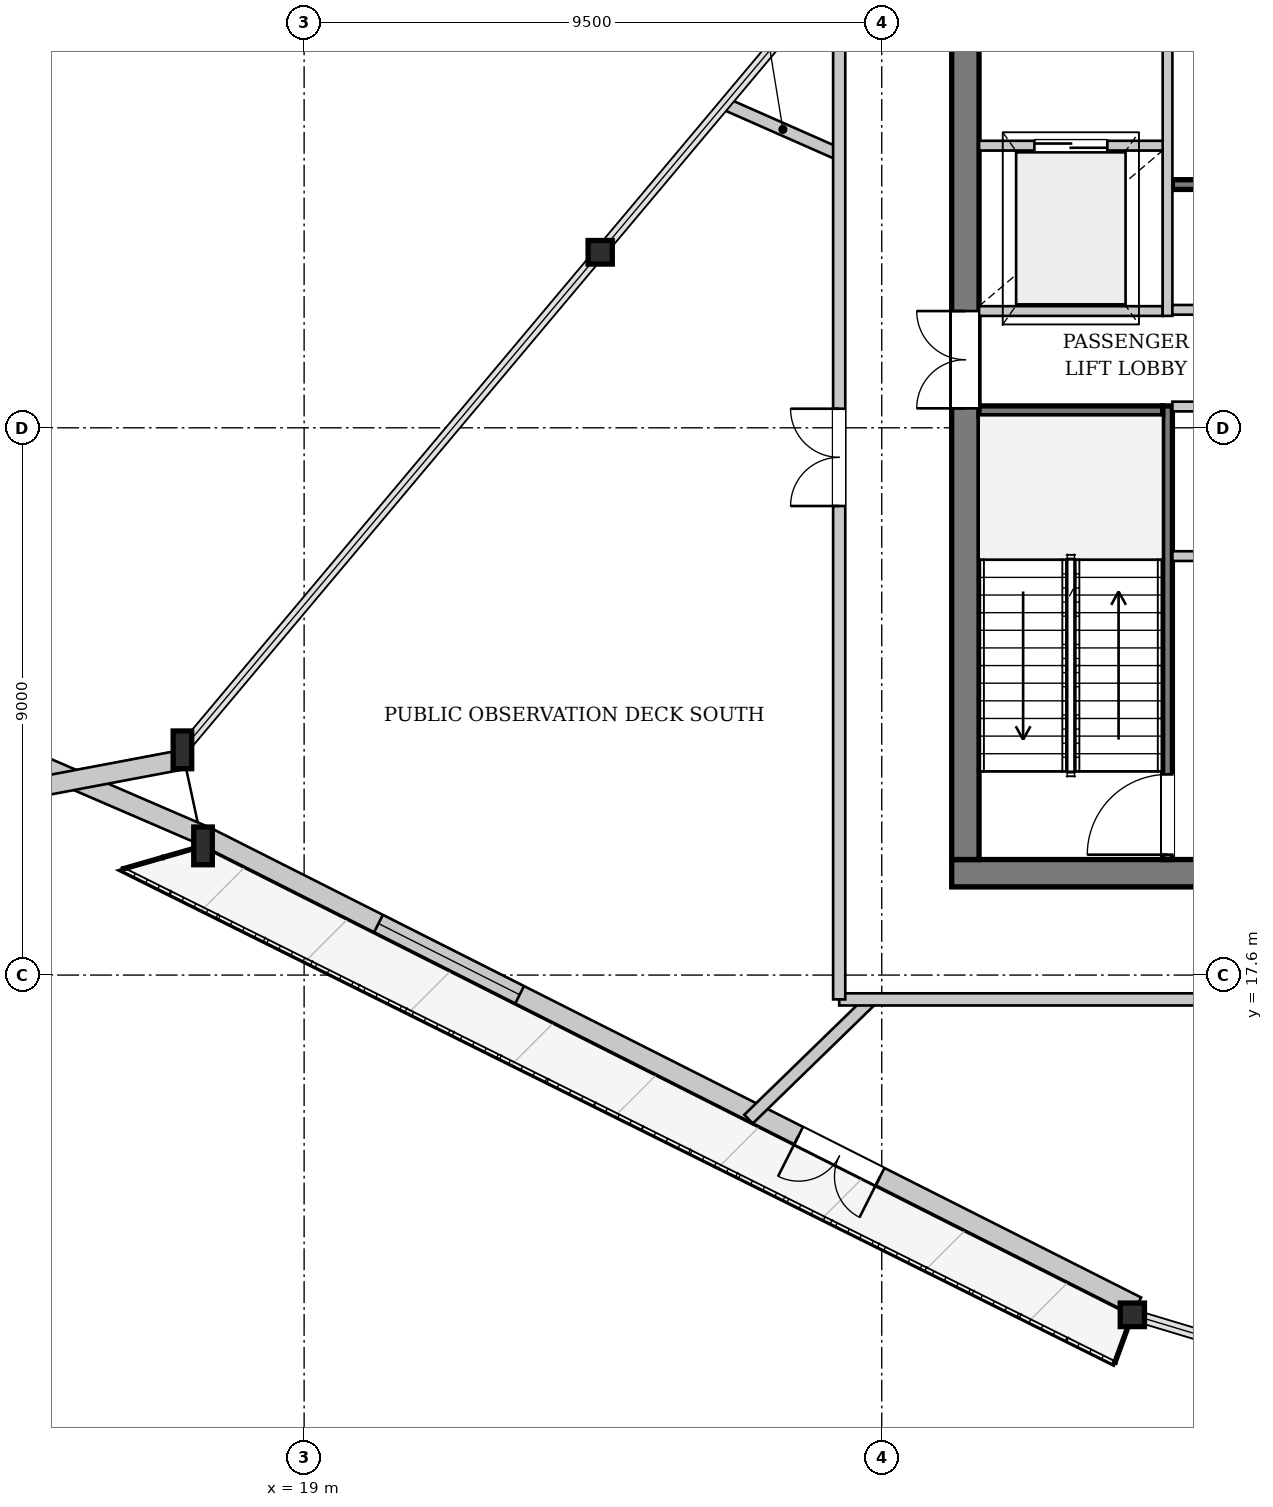
"""IFC4 building model, lengths in metres.
Left out: names, types, materials, properties, quantities, classifications, styles, units other than length and angle.
Written with IfcOpenShell. Run it as: python <this file> out.ifc"""

import sys

from ifc_helpers import new_model, si_unit, direction, frame, frame_2d, origin, origin_2d, place, context, subcontext, project, spatial, rectangle, i_section, extrude, source, transform, mapped, element, fill, save


model = new_model("IFC4")
c1 = context("Model", 3, precision=1e-05, world=origin(), true_north=direction((0.0, 1.0)))
c2 = subcontext(c1, "Body", "Model", "MODEL_VIEW")
j1 = project(units=[si_unit("LENGTHUNIT", "METRE"), si_unit("PLANEANGLEUNIT", "RADIAN")], contexts=[c1])
p1 = place(None, origin())
s1 = spatial("IfcSite", under=j1, at=p1, CompositionType="ELEMENT")
p2 = place(p1, origin())
s2 = spatial("IfcBuilding", under=s1, at=p2, CompositionType="ELEMENT")
p3 = place(p2, frame((0.0, 0.0, 290.5)))
s3 = spatial("IfcBuildingStorey", under=s2, at=p3, CompositionType="ELEMENT", Elevation=290.5)
m1 = source(origin(), c2, "Body", "SweptSolid", [
    extrude(i_section(OverallWidth=0.398, OverallDepth=0.387, WebThickness=0.019, FlangeThickness=0.029, at=origin_2d()), origin(), (0.0, 0.0, 1.0), 4.255),
])
p4 = place(p3, frame((23.869, 29.486, 0.0), z_axis=(0.0, 0.0, 1.0), x_axis=(1.0, 0.0, 0.0)))
e1 = element("IfcColumn", 1, at=p4, inside=s3, PredefinedType="COLUMN", context=c2, shape_type="MappedRepresentation", body=[
    mapped(m1, transform((0.0, 0.0, 0.0), x_axis=(1.0, 0.0, 0.0), y_axis=(0.0, 1.0, 0.0), z_axis=(0.0, 0.0, 1.0), scale=1.0)),
])
m2 = source(origin(), c2, "Body", "SweptSolid", [
    extrude(i_section(OverallWidth=0.305, OverallDepth=0.62, WebThickness=0.021, FlangeThickness=0.04, at=origin_2d()), origin(), (0.0, 0.0, 1.0), 4.255),
])
for number, where, z_axis, x_axis in (
    (2, (16.999, 21.304, 0.0), (0.0, 0.0, 1.0), (1.0, 0.0, 0.0)),
    (3, (17.337, 19.725, 0.0), (0.0, 0.0, 1.0), (1.0, 0.0, 0.0)),
):
    element("IfcColumn", number, at=place(p3, frame(where, z_axis=z_axis, x_axis=x_axis)), inside=s3, PredefinedType="COLUMN", context=c2, shape_type="MappedRepresentation", body=[
        mapped(m2, transform((0.0, 0.0, 0.0), x_axis=(1.0, 0.0, 0.0), y_axis=(0.0, 1.0, 0.0), z_axis=(0.0, 0.0, 1.0), scale=1.0)),
    ])
p5 = place(p3, frame((32.621, 12.012, 0.0), z_axis=(0.0, 0.0, 1.0), x_axis=(1.0, 0.0, 0.0)))
e4 = element("IfcColumn", 4, at=p5, inside=s3, PredefinedType="COLUMN", context=c2, shape_type="MappedRepresentation", body=[
    mapped(m1, transform((0.0, 0.0, 0.0), x_axis=(1.0, 0.0, 0.0), y_axis=(0.0, 1.0, 0.0), z_axis=(0.0, 0.0, 1.0), scale=1.0)),
])
p6 = place(p3, frame((32.694, 12.155, 0.0), z_axis=(0.0, 0.0, 1.0), x_axis=(-0.89278116215, 0.450490617561, 0.0)))
e5 = element("IfcWall", 5, at=p6, inside=s3, PredefinedType="SOLIDWALL", context=c2, shape_type="SweptSolid", body=[
    extrude(rectangle(XDim=17.119, YDim=0.32, at=frame_2d((8.56, 0.0))), origin(), (0.0, 0.0, 1.0), 3.782),
])
p7 = place(p6, frame((4.728, 0.0, 0.0)))
e6 = element("IfcOpeningElement", 6, at=p7, cuts=e5, PredefinedType="OPENING", context=c2, shape_type="SweptSolid", body=[
    extrude(rectangle(XDim=1.5, YDim=2.3, at=frame_2d((0.75, 1.15))), frame((0.0, 0.17, 0.0), z_axis=(0.0, -1.0, 0.0), x_axis=(1.0, 0.0, 0.0)), (0.0, 0.0, 1.0), 0.34),
])
p8 = place(p6, frame((11.368, 0.0, 0.65)))
e7 = element("IfcOpeningElement", 7, at=p8, cuts=e5, PredefinedType="OPENING", context=c2, shape_type="SweptSolid", body=[
    extrude(rectangle(XDim=2.6, YDim=2.35, at=frame_2d((1.3, 1.175))), frame((0.0, 0.17, 0.0), z_axis=(0.0, -1.0, 0.0), x_axis=(1.0, 0.0, 0.0)), (0.0, 0.0, 1.0), 0.34),
])
p9 = place(p3, frame((17.401, 19.872, 0.0), z_axis=(0.0, 0.0, 1.0), x_axis=(-0.918056053797, 0.396450604852, 0.0)))
e8 = element("IfcWall", 8, at=p9, inside=s3, PredefinedType="SOLIDWALL", context=c2, shape_type="SweptSolid", body=[
    extrude(rectangle(XDim=2.885, YDim=0.32, at=frame_2d((1.442, 0.0))), origin(), (0.0, 0.0, 1.0), 3.782),
])
p10 = place(p3, frame((14.719, 20.711, 0.0), z_axis=(0.0, 0.0, 1.0), x_axis=(0.98266700848, 0.185379476869, 0.0)))
e9 = element("IfcWall", 9, at=p10, inside=s3, PredefinedType="SOLIDWALL", context=c2, shape_type="SweptSolid", body=[
    extrude(rectangle(XDim=2.351, YDim=0.32, at=frame_2d((1.175, 0.0))), origin(), (0.0, 0.0, 1.0), 3.782),
])
p11 = place(p3, frame((46.35, 19.275, 0.0), z_axis=(0.0, 0.0, 1.0), x_axis=(-1.0, 0.0, 0.0)))
e10 = element("IfcWall", 10, at=p11, inside=s3, PredefinedType="SHEAR", context=c2, shape_type="SweptSolid", body=[
    extrude(rectangle(XDim=16.7, YDim=0.45, at=frame_2d((8.35, 0.0))), origin(), (0.0, 0.0, 1.0), 4.24),
])
p12 = place(p11, frame((4.55, 0.0, 0.0)))
e11 = element("IfcOpeningElement", 11, at=p12, cuts=e10, PredefinedType="OPENING", context=c2, shape_type="SweptSolid", body=[
    extrude(rectangle(XDim=1.12, YDim=2.25, at=frame_2d((0.56, 1.125))), frame((0.0, 0.235, 0.0), z_axis=(0.0, -1.0, 0.0), x_axis=(1.0, 0.0, 0.0)), (0.0, 0.0, 1.0), 0.47),
])
p13 = place(p11, frame((11.05, 0.0, 0.0)))
e12 = element("IfcOpeningElement", 12, at=p13, cuts=e10, PredefinedType="OPENING", context=c2, shape_type="SweptSolid", body=[
    extrude(rectangle(XDim=1.12, YDim=2.25, at=frame_2d((0.56, 1.125))), frame((0.0, 0.235, 0.0), z_axis=(0.0, -1.0, 0.0), x_axis=(1.0, 0.0, 0.0)), (0.0, 0.0, 1.0), 0.47),
])
p14 = place(p3, frame((29.875, 19.5, 0.0), z_axis=(0.0, 0.0, 1.0), x_axis=(0.0, 1.0, 0.0)))
e13 = element("IfcWall", 13, at=p14, inside=s3, PredefinedType="SHEAR", context=c2, shape_type="SweptSolid", body=[
    extrude(rectangle(XDim=14.2, YDim=0.45, at=frame_2d((7.1, 0.0))), origin(), (0.0, 0.0, 1.0), 4.24),
])
p15 = place(p14, frame((7.42, 0.0, 0.0)))
e14 = element("IfcOpeningElement", 14, at=p15, cuts=e13, PredefinedType="OPENING", context=c2, shape_type="SweptSolid", body=[
    extrude(rectangle(XDim=1.6, YDim=2.2, at=frame_2d((0.8, 1.1))), frame((0.0, 0.235, 0.0), z_axis=(0.0, -1.0, 0.0), x_axis=(1.0, 0.0, 0.0)), (0.0, 0.0, 1.0), 0.47),
])
p16 = place(p3, frame((33.2, 19.5, 0.0), z_axis=(0.0, 0.0, 1.0), x_axis=(0.0, 1.0, 0.0)))
e15 = element("IfcWall", 15, at=p16, inside=s3, PredefinedType="PARTITIONING", context=c2, shape_type="SweptSolid", body=[
    extrude(rectangle(XDim=7.46, YDim=0.16, at=frame_2d((3.73, 0.0))), origin(), (0.0, 0.0, 1.0), 4.24),
])
p17 = place(p16, frame((0.08, 0.0, 0.0)))
e16 = element("IfcOpeningElement", 16, at=p17, cuts=e15, PredefinedType="OPENING", context=c2, shape_type="SweptSolid", body=[
    extrude(rectangle(XDim=1.32, YDim=2.2, at=frame_2d((0.66, 1.1))), frame((0.0, 0.09, 0.0), z_axis=(0.0, -1.0, 0.0), x_axis=(1.0, 0.0, 0.0)), (0.0, 0.0, 1.0), 0.18),
])
p18 = place(p3, frame((30.1, 26.88, 0.0), z_axis=(0.0, 0.0, 1.0), x_axis=(1.0, 0.0, 0.0)))
e17 = element("IfcWall", 17, at=p18, inside=s3, PredefinedType="PARTITIONING", context=c2, shape_type="SweptSolid", body=[
    extrude(rectangle(XDim=3.02, YDim=0.16, at=frame_2d((1.51, 0.0))), origin(), (0.0, 0.0, 1.0), 4.24),
])
p19 = place(p3, frame((33.28, 30.6, 0.0), z_axis=(0.0, 0.0, 1.0), x_axis=(1.0, 0.0, 0.0)))
e18 = element("IfcWall", 18, at=p19, inside=s3, PredefinedType="PARTITIONING", context=c2, shape_type="SweptSolid", body=[
    extrude(rectangle(XDim=7.3, YDim=0.16, at=frame_2d((3.65, 0.0))), origin(), (0.0, 0.0, 1.0), 4.24),
])
p20 = place(p3, frame((33.28, 24.49, 0.0), z_axis=(0.0, 0.0, 1.0), x_axis=(1.0, 0.0, 0.0)))
e19 = element("IfcWall", 19, at=p20, inside=s3, PredefinedType="PARTITIONING", context=c2, shape_type="SweptSolid", body=[
    extrude(rectangle(XDim=9.44, YDim=0.16, at=frame_2d((4.72, 0.0))), origin(), (0.0, 0.0, 1.0), 4.24),
])
p21 = place(p20, frame((0.85, 0.0, 0.95)))
e20 = element("IfcOpeningElement", 20, at=p21, cuts=e19, PredefinedType="OPENING", context=c2, shape_type="SweptSolid", body=[
    extrude(rectangle(XDim=1.4, YDim=1.8, at=frame_2d((0.7, 0.9))), frame((0.0, 0.09, 0.0), z_axis=(0.0, -1.0, 0.0), x_axis=(1.0, 0.0, 0.0)), (0.0, 0.0, 1.0), 0.18),
])
p22 = place(p3, frame((30.1, 28.52, 0.0), z_axis=(0.0, 0.0, 1.0), x_axis=(1.0, 0.0, 0.0)))
e21 = element("IfcWall", 21, at=p22, inside=s3, PredefinedType="PARTITIONING", context=c2, shape_type="SweptSolid", body=[
    extrude(rectangle(XDim=3.02, YDim=0.16, at=frame_2d((1.51, 0.0))), origin(), (0.0, 0.0, 1.0), 4.24),
])
p23 = place(p3, frame((33.2, 28.44, 0.0), z_axis=(0.0, 0.0, 1.0), x_axis=(0.0, 1.0, 0.0)))
e22 = element("IfcWall", 22, at=p23, inside=s3, PredefinedType="PARTITIONING", context=c2, shape_type="SweptSolid", body=[
    extrude(rectangle(XDim=5.26, YDim=0.16, at=frame_2d((2.63, 0.0))), origin(), (0.0, 0.0, 1.0), 4.24),
])
p24 = place(p3, frame((30.1, 31.24, 0.0), z_axis=(0.0, 0.0, 1.0), x_axis=(1.0, 0.0, 0.0)))
e23 = element("IfcWall", 23, at=p24, inside=s3, PredefinedType="PARTITIONING", context=c2, shape_type="SweptSolid", body=[
    extrude(rectangle(XDim=3.02, YDim=0.16, at=frame_2d((1.51, 0.0))), origin(), (0.0, 0.0, 1.0), 4.24),
])
p25 = place(p24, frame((0.91, 0.0, 0.0)))
e24 = element("IfcOpeningElement", 24, at=p25, cuts=e23, PredefinedType="OPENING", context=c2, shape_type="SweptSolid", body=[
    extrude(rectangle(XDim=1.2, YDim=2.2, at=frame_2d((0.6, 1.1))), frame((0.0, 0.09, 0.0), z_axis=(0.0, -1.0, 0.0), x_axis=(1.0, 0.0, 0.0)), (0.0, 0.0, 1.0), 0.18),
])
p26 = place(p3, frame((33.28, 26.95, 0.0), z_axis=(0.0, 0.0, 1.0), x_axis=(1.0, 0.0, 0.0)))
e25 = element("IfcWall", 25, at=p26, inside=s3, PredefinedType="PARTITIONING", context=c2, shape_type="SweptSolid", body=[
    extrude(rectangle(XDim=9.44, YDim=0.16, at=frame_2d((4.72, 0.0))), origin(), (0.0, 0.0, 1.0), 4.24),
])
p27 = place(p26, frame((1.2, 0.0, 0.0)))
e26 = element("IfcOpeningElement", 26, at=p27, cuts=e25, PredefinedType="OPENING", context=c2, shape_type="SweptSolid", body=[
    extrude(rectangle(XDim=0.95, YDim=2.1, at=frame_2d((0.475, 1.05))), frame((0.0, 0.09, 0.0), z_axis=(0.0, -1.0, 0.0), x_axis=(1.0, 0.0, 0.0)), (0.0, 0.0, 1.0), 0.18),
])
p28 = place(p26, frame((4.65, 0.0, 0.0)))
e27 = element("IfcOpeningElement", 27, at=p28, cuts=e25, PredefinedType="OPENING", context=c2, shape_type="SweptSolid", body=[
    extrude(rectangle(XDim=0.95, YDim=2.1, at=frame_2d((0.475, 1.05))), frame((0.0, 0.09, 0.0), z_axis=(0.0, -1.0, 0.0), x_axis=(1.0, 0.0, 0.0)), (0.0, 0.0, 1.0), 0.18),
])
p29 = place(p26, frame((7.745, 0.0, 0.0)))
e28 = element("IfcOpeningElement", 28, at=p29, cuts=e25, PredefinedType="OPENING", context=c2, shape_type="SweptSolid", body=[
    extrude(rectangle(XDim=0.95, YDim=2.1, at=frame_2d((0.475, 1.05))), frame((0.0, 0.09, 0.0), z_axis=(0.0, -1.0, 0.0), x_axis=(1.0, 0.0, 0.0)), (0.0, 0.0, 1.0), 0.18),
])
p30 = place(p3, frame((33.28, 28.54, 0.0), z_axis=(0.0, 0.0, 1.0), x_axis=(1.0, 0.0, 0.0)))
e29 = element("IfcWall", 29, at=p30, inside=s3, PredefinedType="PARTITIONING", context=c2, shape_type="SweptSolid", body=[
    extrude(rectangle(XDim=12.62, YDim=0.16, at=frame_2d((6.31, 0.0))), origin(), (0.0, 0.0, 1.0), 4.24),
])
p31 = place(p30, frame((0.8, 0.0, 0.0)))
e30 = element("IfcOpeningElement", 30, at=p31, cuts=e29, PredefinedType="OPENING", context=c2, shape_type="SweptSolid", body=[
    extrude(rectangle(XDim=0.95, YDim=2.1, at=frame_2d((0.475, 1.05))), frame((0.0, 0.09, 0.0), z_axis=(0.0, -1.0, 0.0), x_axis=(1.0, 0.0, 0.0)), (0.0, 0.0, 1.0), 0.18),
])
p32 = place(p30, frame((3.3, 0.0, 0.0)))
e31 = element("IfcOpeningElement", 31, at=p32, cuts=e29, PredefinedType="OPENING", context=c2, shape_type="SweptSolid", body=[
    extrude(rectangle(XDim=0.95, YDim=2.1, at=frame_2d((0.475, 1.05))), frame((0.0, 0.09, 0.0), z_axis=(0.0, -1.0, 0.0), x_axis=(1.0, 0.0, 0.0)), (0.0, 0.0, 1.0), 0.18),
])
p33 = place(p30, frame((5.63, 0.0, 0.0)))
e32 = element("IfcOpeningElement", 32, at=p33, cuts=e29, PredefinedType="OPENING", context=c2, shape_type="SweptSolid", body=[
    extrude(rectangle(XDim=1.1, YDim=2.2, at=frame_2d((0.55, 1.1))), frame((0.0, 0.09, 0.0), z_axis=(0.0, -1.0, 0.0), x_axis=(1.0, 0.0, 0.0)), (0.0, 0.0, 1.0), 0.18),
])
p34 = place(p30, frame((7.76, 0.0, 0.0)))
e33 = element("IfcOpeningElement", 33, at=p34, cuts=e29, PredefinedType="OPENING", context=c2, shape_type="SweptSolid", body=[
    extrude(rectangle(XDim=1.1, YDim=2.2, at=frame_2d((0.55, 1.1))), frame((0.0, 0.09, 0.0), z_axis=(0.0, -1.0, 0.0), x_axis=(1.0, 0.0, 0.0)), (0.0, 0.0, 1.0), 0.18),
])
p35 = place(p30, frame((10.56, 0.0, 0.0)))
e34 = element("IfcOpeningElement", 34, at=p35, cuts=e29, PredefinedType="OPENING", context=c2, shape_type="SweptSolid", body=[
    extrude(rectangle(XDim=1.1, YDim=2.2, at=frame_2d((0.55, 1.1))), frame((0.0, 0.09, 0.0), z_axis=(0.0, -1.0, 0.0), x_axis=(1.0, 0.0, 0.0)), (0.0, 0.0, 1.0), 0.18),
])
p36 = place(p3, frame((27.8, 31.099, 0.0), z_axis=(0.0, 0.0, 1.0), x_axis=(-0.914957108881, 0.403551098261, 0.0)))
e35 = element("IfcWall", 35, at=p36, inside=s3, PredefinedType="PARTITIONING", context=c2, shape_type="SweptSolid", body=[
    extrude(rectangle(XDim=2.024, YDim=0.2, at=frame_2d((1.012, 0.0))), origin(), (0.0, 0.0, 1.0), 4.24),
])
p37 = place(p3, frame((28.334, 17.2, 0.0), z_axis=(0.0, 0.0, 1.0), x_axis=(-0.716936105059, -0.697138882334, 0.0)))
e36 = element("IfcWall", 36, at=p37, inside=s3, PredefinedType="PARTITIONING", context=c2, shape_type="SweptSolid", body=[
    extrude(rectangle(XDim=2.824, YDim=0.2, at=frame_2d((1.412, 0.0))), origin(), (0.0, 0.0, 1.0), 4.24),
])
p38 = place(p3, frame((27.8, 17.2, 0.0), z_axis=(0.0, 0.0, 1.0), x_axis=(1.0, 0.0, 0.0)))
e37 = element("IfcWall", 37, at=p38, inside=s3, PredefinedType="PARTITIONING", context=c2, shape_type="SweptSolid", body=[
    extrude(rectangle(XDim=20.4, YDim=0.2, at=frame_2d((10.2, 0.0))), origin(), (0.0, 0.0, 1.0), 3.865),
])
p39 = place(p38, frame((7.835, 0.0, 0.0)))
e38 = element("IfcOpeningElement", 38, at=p39, cuts=e37, PredefinedType="OPENING", context=c2, shape_type="SweptSolid", body=[
    extrude(rectangle(XDim=1.05, YDim=2.2, at=frame_2d((0.525, 1.1))), frame((0.0, 0.11, 0.0), z_axis=(0.0, -1.0, 0.0), x_axis=(1.0, 0.0, 0.0)), (0.0, 0.0, 1.0), 0.22),
])
p40 = place(p38, frame((18.182, 0.0, 0.0)))
e39 = element("IfcOpeningElement", 39, at=p40, cuts=e37, PredefinedType="OPENING", context=c2, shape_type="SweptSolid", body=[
    extrude(rectangle(XDim=1.05, YDim=2.2, at=frame_2d((0.525, 1.1))), frame((0.0, 0.11, 0.0), z_axis=(0.0, -1.0, 0.0), x_axis=(1.0, 0.0, 0.0)), (0.0, 0.0, 1.0), 0.22),
])
p41 = place(p3, frame((27.8, 17.2, 0.0), z_axis=(0.0, 0.0, 1.0), x_axis=(0.0, 1.0, 0.0)))
e40 = element("IfcWall", 40, at=p41, inside=s3, PredefinedType="PARTITIONING", context=c2, shape_type="SweptSolid", body=[
    extrude(rectangle(XDim=16.92, YDim=0.2, at=frame_2d((8.46, 0.0))), origin(), (0.0, 0.0, 1.0), 4.24),
])
p42 = place(p41, frame((8.114, 0.0, 0.0)))
e41 = element("IfcOpeningElement", 41, at=p42, cuts=e40, PredefinedType="OPENING", context=c2, shape_type="SweptSolid", body=[
    extrude(rectangle(XDim=1.6, YDim=2.2, at=frame_2d((0.8, 1.1))), frame((0.0, 0.11, 0.0), z_axis=(0.0, -1.0, 0.0), x_axis=(1.0, 0.0, 0.0)), (0.0, 0.0, 1.0), 0.22),
])
m3 = source(origin(), c2, "Body", "SweptSolid", [
    extrude(rectangle(XDim=1.5, YDim=2.3, at=frame_2d((0.75, 1.15))), frame((0.0, 0.025, 0.0), z_axis=(0.0, -1.0, 0.0), x_axis=(1.0, 0.0, 0.0)), (0.0, 0.0, 1.0), 0.05),
])
p43 = place(p7, origin())
e42 = element("IfcDoor", 42, at=p43, inside=s3, OperationType="DOUBLE_DOOR_SINGLE_SWING", PredefinedType="DOOR", context=c2, shape_type="MappedRepresentation", body=[
    mapped(m3, transform((0.0, 0.0, 0.0), x_axis=(1.0, 0.0, 0.0), y_axis=(0.0, 1.0, 0.0), z_axis=(0.0, 0.0, 1.0), scale=1.0)),
])
fill(e6, e42)
m4 = source(origin(), c2, "Body", "SweptSolid", [
    extrude(rectangle(XDim=2.6, YDim=2.35, at=frame_2d((1.3, 1.175))), frame((0.0, 0.03, 0.0), z_axis=(0.0, -1.0, 0.0), x_axis=(1.0, 0.0, 0.0)), (0.0, 0.0, 1.0), 0.06),
])
p44 = place(p8, origin())
e43 = element("IfcWindow", 43, at=p44, inside=s3, PartitioningType="SINGLE_PANEL", PredefinedType="WINDOW", context=c2, shape_type="MappedRepresentation", body=[
    mapped(m4, transform((0.0, 0.0, 0.0), x_axis=(1.0, 0.0, 0.0), y_axis=(0.0, 1.0, 0.0), z_axis=(0.0, 0.0, 1.0), scale=1.0)),
])
fill(e7, e43)
m5 = source(origin(), c2, "Body", "SweptSolid", [
    extrude(rectangle(XDim=1.6, YDim=2.2, at=frame_2d((0.8, 1.1))), frame((0.0, 0.025, 0.0), z_axis=(0.0, -1.0, 0.0), x_axis=(1.0, 0.0, 0.0)), (0.0, 0.0, 1.0), 0.05),
])
p45 = place(p15, origin())
e44 = element("IfcDoor", 44, at=p45, inside=s3, OperationType="DOUBLE_DOOR_SINGLE_SWING", PredefinedType="DOOR", context=c2, shape_type="MappedRepresentation", body=[
    mapped(m5, transform((0.0, 0.0, 0.0), x_axis=(1.0, 0.0, 0.0), y_axis=(0.0, 1.0, 0.0), z_axis=(0.0, 0.0, 1.0), scale=1.0)),
])
fill(e14, e44)
m6 = source(origin(), c2, "Body", "SweptSolid", [
    extrude(rectangle(XDim=1.32, YDim=2.2, at=frame_2d((0.66, 1.1))), frame((0.0, 0.025, 0.0), z_axis=(0.0, -1.0, 0.0), x_axis=(1.0, 0.0, 0.0)), (0.0, 0.0, 1.0), 0.05),
])
p46 = place(p17, origin())
e45 = element("IfcDoor", 45, at=p46, inside=s3, OperationType="SINGLE_SWING_LEFT", PredefinedType="DOOR", context=c2, shape_type="MappedRepresentation", body=[
    mapped(m6, transform((0.0, 0.0, 0.0), x_axis=(1.0, 0.0, 0.0), y_axis=(0.0, 1.0, 0.0), z_axis=(0.0, 0.0, 1.0), scale=1.0)),
])
fill(e16, e45)
m7 = source(origin(), c2, "Body", "SweptSolid", [
    extrude(rectangle(XDim=1.2, YDim=2.2, at=frame_2d((0.6, 1.1))), frame((0.0, 0.025, 0.0), z_axis=(0.0, -1.0, 0.0), x_axis=(1.0, 0.0, 0.0)), (0.0, 0.0, 1.0), 0.05),
])
p47 = place(p25, origin())
e46 = element("IfcDoor", 46, at=p47, inside=s3, OperationType="DOUBLE_DOOR_SLIDING", PredefinedType="DOOR", context=c2, shape_type="MappedRepresentation", body=[
    mapped(m7, transform((0.0, 0.0, 0.0), x_axis=(1.0, 0.0, 0.0), y_axis=(0.0, 1.0, 0.0), z_axis=(0.0, 0.0, 1.0), scale=1.0)),
])
fill(e24, e46)
p48 = place(p42, origin())
e47 = element("IfcDoor", 47, at=p48, inside=s3, OperationType="DOUBLE_DOOR_SINGLE_SWING", PredefinedType="DOOR", context=c2, shape_type="MappedRepresentation", body=[
    mapped(m5, transform((0.0, 0.0, 0.0), x_axis=(1.0, 0.0, 0.0), y_axis=(0.0, 1.0, 0.0), z_axis=(0.0, 0.0, 1.0), scale=1.0)),
])
fill(e41, e47)
save(model, sys.argv[1])
